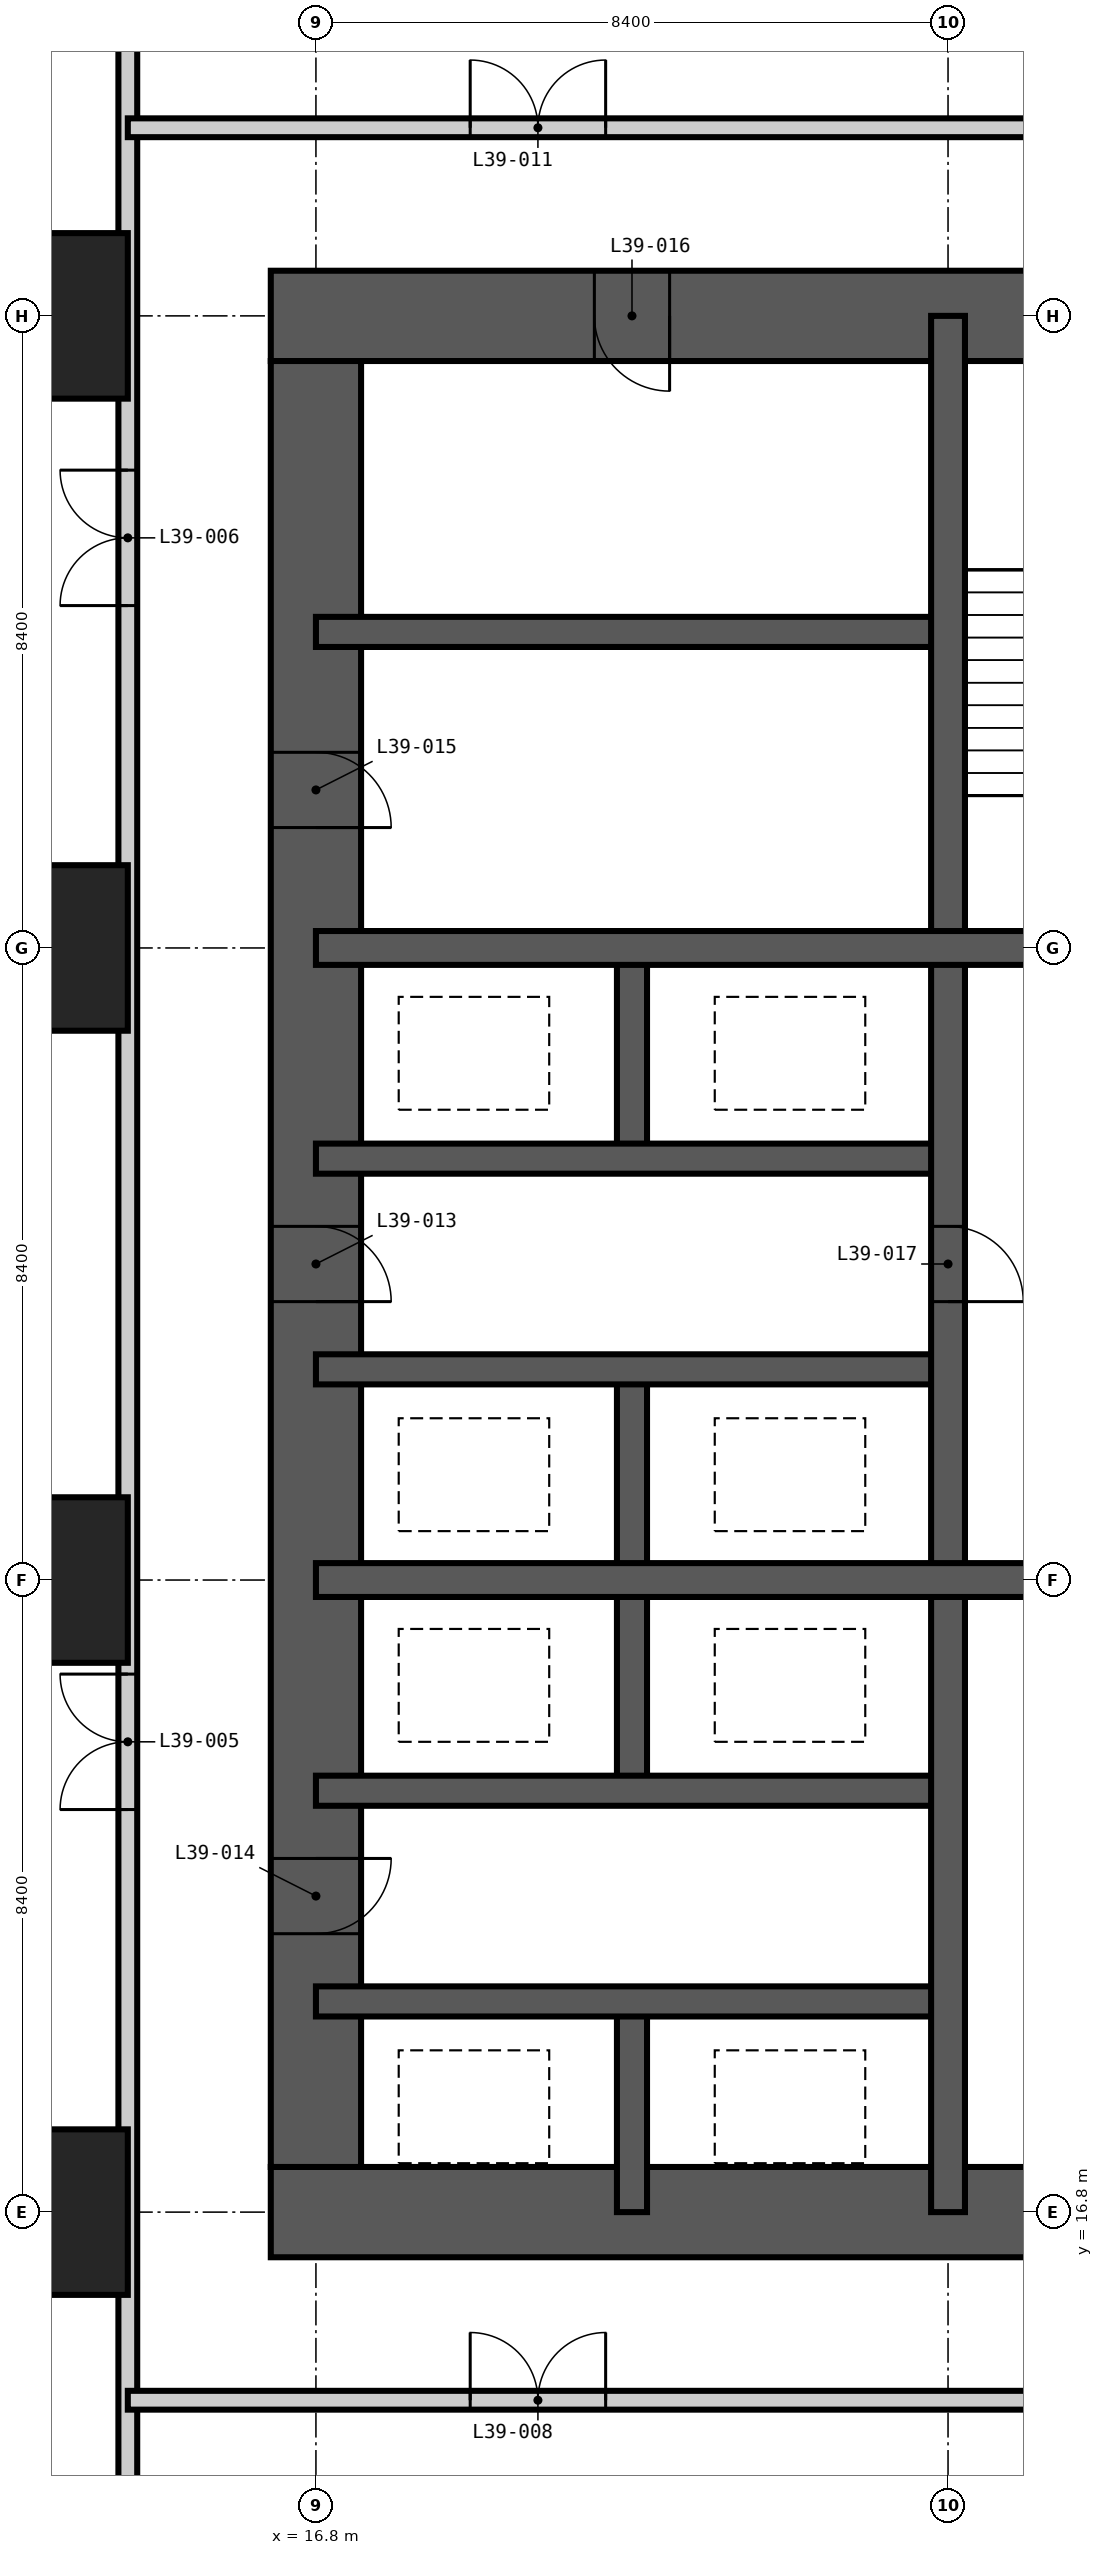
"""IFC4 building model, lengths in metres.
Left out: names, types, materials, properties, quantities, classifications, styles, units other than length and angle.
Written with IfcOpenShell. Run it as: python <this file> out.ifc"""

import sys

from ifc_helpers import new_model, si_unit, direction, frame, frame_2d, origin, origin_2d, place, context, subcontext, project, spatial, rectangle, extrude, element, fill, save


model = new_model("IFC4")
c1 = context("Model", 3, precision=1e-05, world=origin(), true_north=direction((0.0, 1.0)))
c2 = subcontext(c1, "Body", "Model", "MODEL_VIEW")
j1 = project(units=[si_unit("LENGTHUNIT", "METRE"), si_unit("PLANEANGLEUNIT", "RADIAN")], contexts=[c1])
p1 = place(None, origin())
s1 = spatial("IfcSite", under=j1, at=p1, CompositionType="ELEMENT")
p2 = place(p1, origin())
s2 = spatial("IfcBuilding", under=s1, at=p2, CompositionType="ELEMENT")
p3 = place(p2, frame((0.0, 0.0, 153.6)))
s3 = spatial("IfcBuildingStorey", under=s2, at=p3, CompositionType="ELEMENT", Elevation=153.6)
for number, where, z_axis, x_axis in (
    (1, (13.2, 16.8, -0.4), (0.0, 0.0, 1.0), (1.0, 0.0, 0.0)),
    (2, (13.2, 25.2, -0.4), (0.0, 0.0, 1.0), (1.0, 0.0, 0.0)),
    (3, (13.2, 33.6, -0.4), (0.0, 0.0, 1.0), (1.0, 0.0, 0.0)),
    (4, (13.2, 42.0, -0.4), (0.0, 0.0, 1.0), (1.0, 0.0, 0.0)),
):
    element("IfcColumn", number, at=place(p3, frame(where, z_axis=z_axis, x_axis=x_axis)), inside=s3, PredefinedType="COLUMN", context=c2, shape_type="SweptSolid", body=[
        extrude(rectangle(XDim=2.2, YDim=2.2, at=origin_2d()), origin(), (0.0, 0.0, 1.0), 5.45),
    ])
p4 = place(p3, frame((16.2, 16.8, -0.4), z_axis=(0.0, 0.0, 1.0), x_axis=(1.0, 0.0, 0.0)))
e5 = element("IfcWall", 5, at=p4, inside=s3, PredefinedType="SHEAR", context=c2, shape_type="SweptSolid", body=[
    extrude(rectangle(XDim=26.4, YDim=1.2, at=frame_2d((13.2, 0.0))), origin(), (0.0, 0.0, 1.0), 5.45),
])
p5 = place(p4, frame((12.7, 0.0, 0.4)))
e6 = element("IfcOpeningElement", 6, at=p5, cuts=e5, PredefinedType="OPENING", context=c2, shape_type="SweptSolid", body=[
    extrude(rectangle(XDim=1.0, YDim=2.1, at=frame_2d((0.5, 1.05))), frame((0.0, 0.61, 0.0), z_axis=(0.0, -1.0, 0.0), x_axis=(1.0, 0.0, 0.0)), (0.0, 0.0, 1.0), 1.22),
])
p6 = place(p4, frame((19.0, 0.0, 0.4)))
e7 = element("IfcOpeningElement", 7, at=p6, cuts=e5, PredefinedType="OPENING", context=c2, shape_type="SweptSolid", body=[
    extrude(rectangle(XDim=1.0, YDim=2.1, at=frame_2d((0.5, 1.05))), frame((0.0, 0.61, 0.0), z_axis=(0.0, -1.0, 0.0), x_axis=(1.0, 0.0, 0.0)), (0.0, 0.0, 1.0), 1.22),
])
p7 = place(p3, frame((42.6, 42.0, -0.4), z_axis=(0.0, 0.0, 1.0), x_axis=(-1.0, 0.0, 0.0)))
e8 = element("IfcWall", 8, at=p7, inside=s3, PredefinedType="SHEAR", context=c2, shape_type="SweptSolid", body=[
    extrude(rectangle(XDim=26.4, YDim=1.2, at=frame_2d((13.2, 0.0))), origin(), (0.0, 0.0, 1.0), 5.45),
])
p8 = place(p7, frame((21.1, 0.0, 0.4)))
e9 = element("IfcOpeningElement", 9, at=p8, cuts=e8, PredefinedType="OPENING", context=c2, shape_type="SweptSolid", body=[
    extrude(rectangle(XDim=1.0, YDim=2.1, at=frame_2d((0.5, 1.05))), frame((0.0, 0.61, 0.0), z_axis=(0.0, -1.0, 0.0), x_axis=(1.0, 0.0, 0.0)), (0.0, 0.0, 1.0), 1.22),
])
p9 = place(p7, frame((10.5, 0.0, 0.4)))
e10 = element("IfcOpeningElement", 10, at=p9, cuts=e8, PredefinedType="OPENING", context=c2, shape_type="SweptSolid", body=[
    extrude(rectangle(XDim=1.2, YDim=2.2, at=frame_2d((0.6, 1.1))), frame((0.0, 0.61, 0.0), z_axis=(0.0, -1.0, 0.0), x_axis=(1.0, 0.0, 0.0)), (0.0, 0.0, 1.0), 1.22),
])
p10 = place(p3, frame((16.8, 41.4, -0.4), z_axis=(0.0, 0.0, 1.0), x_axis=(0.0, -1.0, 0.0)))
e11 = element("IfcWall", 11, at=p10, inside=s3, PredefinedType="SHEAR", context=c2, shape_type="SweptSolid", body=[
    extrude(rectangle(XDim=24.0, YDim=1.2, at=frame_2d((12.0, 0.0))), origin(), (0.0, 0.0, 1.0), 5.45),
])
p11 = place(p10, frame((11.5, 0.0, 0.4)))
e12 = element("IfcOpeningElement", 12, at=p11, cuts=e11, PredefinedType="OPENING", context=c2, shape_type="SweptSolid", body=[
    extrude(rectangle(XDim=1.0, YDim=2.1, at=frame_2d((0.5, 1.05))), frame((0.0, 0.61, 0.0), z_axis=(0.0, -1.0, 0.0), x_axis=(1.0, 0.0, 0.0)), (0.0, 0.0, 1.0), 1.22),
])
p12 = place(p10, frame((19.9, 0.0, 0.4)))
e13 = element("IfcOpeningElement", 13, at=p12, cuts=e11, PredefinedType="OPENING", context=c2, shape_type="SweptSolid", body=[
    extrude(rectangle(XDim=1.0, YDim=2.1, at=frame_2d((0.5, 1.05))), frame((0.0, 0.61, 0.0), z_axis=(0.0, -1.0, 0.0), x_axis=(1.0, 0.0, 0.0)), (0.0, 0.0, 1.0), 1.22),
])
p13 = place(p10, frame((5.2, 0.0, 0.4)))
e14 = element("IfcOpeningElement", 14, at=p13, cuts=e11, PredefinedType="OPENING", context=c2, shape_type="SweptSolid", body=[
    extrude(rectangle(XDim=1.0, YDim=2.1, at=frame_2d((0.5, 1.05))), frame((0.0, 0.61, 0.0), z_axis=(0.0, -1.0, 0.0), x_axis=(1.0, 0.0, 0.0)), (0.0, 0.0, 1.0), 1.22),
])
p14 = place(p3, frame((21.0, 16.8, -0.4), z_axis=(0.0, 0.0, 1.0), x_axis=(0.0, 1.0, 0.0)))
e15 = element("IfcWall", 15, at=p14, inside=s3, PredefinedType="SHEAR", context=c2, shape_type="SweptSolid", body=[
    extrude(rectangle(XDim=2.8, YDim=0.4, at=frame_2d((1.4, 0.0))), origin(), (0.0, 0.0, 1.0), 5.45),
])
p15 = place(p3, frame((21.0, 22.4, -0.4), z_axis=(0.0, 0.0, 1.0), x_axis=(0.0, 1.0, 0.0)))
e16 = element("IfcWall", 16, at=p15, inside=s3, PredefinedType="SHEAR", context=c2, shape_type="SweptSolid", body=[
    extrude(rectangle(XDim=5.6, YDim=0.4, at=frame_2d((2.8, 0.0))), origin(), (0.0, 0.0, 1.0), 5.45),
])
p16 = place(p3, frame((21.0, 30.8, -0.4), z_axis=(0.0, 0.0, 1.0), x_axis=(0.0, 1.0, 0.0)))
e17 = element("IfcWall", 17, at=p16, inside=s3, PredefinedType="SHEAR", context=c2, shape_type="SweptSolid", body=[
    extrude(rectangle(XDim=2.8, YDim=0.4, at=frame_2d((1.4, 0.0))), origin(), (0.0, 0.0, 1.0), 5.45),
])
for number, where, z_axis, x_axis in (
    (18, (16.8, 19.6, -0.4), (0.0, 0.0, 1.0), (1.0, 0.0, 0.0)),
    (19, (16.8, 22.4, -0.4), (0.0, 0.0, 1.0), (1.0, 0.0, 0.0)),
    (20, (16.8, 28.0, -0.4), (0.0, 0.0, 1.0), (1.0, 0.0, 0.0)),
    (21, (16.8, 30.8, -0.4), (0.0, 0.0, 1.0), (1.0, 0.0, 0.0)),
    (22, (16.8, 37.8, -0.4), (0.0, 0.0, 1.0), (1.0, 0.0, 0.0)),
):
    element("IfcWall", number, at=place(p3, frame(where, z_axis=z_axis, x_axis=x_axis)), inside=s3, PredefinedType="SHEAR", context=c2, shape_type="SweptSolid", body=[
        extrude(rectangle(XDim=8.4, YDim=0.4, at=frame_2d((4.2, 0.0))), origin(), (0.0, 0.0, 1.0), 5.45),
    ])
p17 = place(p3, frame((25.2, 16.8, -0.4), z_axis=(0.0, 0.0, 1.0), x_axis=(0.0, 1.0, 0.0)))
e23 = element("IfcWall", 23, at=p17, inside=s3, PredefinedType="SHEAR", context=c2, shape_type="SweptSolid", body=[
    extrude(rectangle(XDim=25.2, YDim=0.45, at=frame_2d((12.6, 0.0))), origin(), (0.0, 0.0, 1.0), 5.45),
])
p18 = place(p17, frame((12.1, 0.0, 0.4)))
e24 = element("IfcOpeningElement", 24, at=p18, cuts=e23, PredefinedType="OPENING", context=c2, shape_type="SweptSolid", body=[
    extrude(rectangle(XDim=1.0, YDim=2.1, at=frame_2d((0.5, 1.05))), frame((0.0, 0.235, 0.0), z_axis=(0.0, -1.0, 0.0), x_axis=(1.0, 0.0, 0.0)), (0.0, 0.0, 1.0), 0.47),
])
for number, where, z_axis, x_axis in (
    (25, (16.8, 25.2, -0.4), (0.0, 0.0, 1.0), (1.0, 0.0, 0.0)),
    (26, (16.8, 33.6, -0.4), (0.0, 0.0, 1.0), (1.0, 0.0, 0.0)),
):
    element("IfcWall", number, at=place(p3, frame(where, z_axis=z_axis, x_axis=x_axis)), inside=s3, PredefinedType="SHEAR", context=c2, shape_type="SweptSolid", body=[
        extrude(rectangle(XDim=25.2, YDim=0.45, at=frame_2d((12.6, 0.0))), origin(), (0.0, 0.0, 1.0), 5.45),
    ])
p19 = place(p3, frame((14.3, -0.018, 0.0), z_axis=(0.0, 0.0, 1.0), x_axis=(0.0, 1.0, 0.0)))
e27 = element("IfcWall", 27, at=p19, inside=s3, PredefinedType="PARTITIONING", context=c2, shape_type="SweptSolid", body=[
    extrude(rectangle(XDim=54.636, YDim=0.25, at=frame_2d((27.318, 0.0))), origin(), (0.0, 0.0, 1.0), 5.05),
])
p20 = place(p19, frame((22.168, 0.0, 0.0)))
e28 = element("IfcOpeningElement", 28, at=p20, cuts=e27, PredefinedType="OPENING", context=c2, shape_type="SweptSolid", body=[
    extrude(rectangle(XDim=1.8, YDim=2.4, at=frame_2d((0.9, 1.2))), frame((0.0, 0.135, 0.0), z_axis=(0.0, -1.0, 0.0), x_axis=(1.0, 0.0, 0.0)), (0.0, 0.0, 1.0), 0.27),
])
p21 = place(p19, frame((38.168, 0.0, 0.0)))
e29 = element("IfcOpeningElement", 29, at=p21, cuts=e27, PredefinedType="OPENING", context=c2, shape_type="SweptSolid", body=[
    extrude(rectangle(XDim=1.8, YDim=2.4, at=frame_2d((0.9, 1.2))), frame((0.0, 0.135, 0.0), z_axis=(0.0, -1.0, 0.0), x_axis=(1.0, 0.0, 0.0)), (0.0, 0.0, 1.0), 0.27),
])
p22 = place(p3, frame((14.3, 14.3, 0.0), z_axis=(0.0, 0.0, 1.0), x_axis=(1.0, 0.0, 0.0)))
e30 = element("IfcWall", 30, at=p22, inside=s3, PredefinedType="PARTITIONING", context=c2, shape_type="SweptSolid", body=[
    extrude(rectangle(XDim=30.2, YDim=0.25, at=frame_2d((15.1, 0.0))), origin(), (0.0, 0.0, 1.0), 5.05),
])
p23 = place(p22, frame((19.65, 0.0, 0.0)))
e31 = element("IfcOpeningElement", 31, at=p23, cuts=e30, PredefinedType="OPENING", context=c2, shape_type="SweptSolid", body=[
    extrude(rectangle(XDim=1.8, YDim=2.4, at=frame_2d((0.9, 1.2))), frame((0.0, 0.135, 0.0), z_axis=(0.0, -1.0, 0.0), x_axis=(1.0, 0.0, 0.0)), (0.0, 0.0, 1.0), 0.27),
])
p24 = place(p22, frame((4.55, 0.0, 0.0)))
e32 = element("IfcOpeningElement", 32, at=p24, cuts=e30, PredefinedType="OPENING", context=c2, shape_type="SweptSolid", body=[
    extrude(rectangle(XDim=1.8, YDim=2.4, at=frame_2d((0.9, 1.2))), frame((0.0, 0.135, 0.0), z_axis=(0.0, -1.0, 0.0), x_axis=(1.0, 0.0, 0.0)), (0.0, 0.0, 1.0), 0.27),
])
p25 = place(p3, frame((14.3, 44.5, 0.0), z_axis=(0.0, 0.0, 1.0), x_axis=(1.0, 0.0, 0.0)))
e33 = element("IfcWall", 33, at=p25, inside=s3, PredefinedType="PARTITIONING", context=c2, shape_type="SweptSolid", body=[
    extrude(rectangle(XDim=30.2, YDim=0.25, at=frame_2d((15.1, 0.0))), origin(), (0.0, 0.0, 1.0), 5.05),
])
p26 = place(p25, frame((4.55, 0.0, 0.0)))
e34 = element("IfcOpeningElement", 34, at=p26, cuts=e33, PredefinedType="OPENING", context=c2, shape_type="SweptSolid", body=[
    extrude(rectangle(XDim=1.8, YDim=2.4, at=frame_2d((0.9, 1.2))), frame((0.0, 0.135, 0.0), z_axis=(0.0, -1.0, 0.0), x_axis=(1.0, 0.0, 0.0)), (0.0, 0.0, 1.0), 0.27),
])
p27 = place(p25, frame((23.85, 0.0, 0.0)))
e35 = element("IfcOpeningElement", 35, at=p27, cuts=e33, PredefinedType="OPENING", context=c2, shape_type="SweptSolid", body=[
    extrude(rectangle(XDim=1.8, YDim=2.4, at=frame_2d((0.9, 1.2))), frame((0.0, 0.135, 0.0), z_axis=(0.0, -1.0, 0.0), x_axis=(1.0, 0.0, 0.0)), (0.0, 0.0, 1.0), 0.27),
])
p28 = place(p20, origin())
e36 = element("IfcDoor", 36, at=p28, inside=s3, OperationType="DOUBLE_DOOR_DOUBLE_SWING", PredefinedType="DOOR", context=c2, shape_type="SweptSolid", body=[
    extrude(rectangle(XDim=1.8, YDim=2.4, at=frame_2d((0.9, 1.2))), frame((0.0, 0.025, 0.0), z_axis=(0.0, -1.0, 0.0), x_axis=(1.0, 0.0, 0.0)), (0.0, 0.0, 1.0), 0.05),
])
fill(e28, e36)
p29 = place(p21, origin())
e37 = element("IfcDoor", 37, at=p29, inside=s3, OperationType="DOUBLE_DOOR_DOUBLE_SWING", PredefinedType="DOOR", context=c2, shape_type="SweptSolid", body=[
    extrude(rectangle(XDim=1.8, YDim=2.4, at=frame_2d((0.9, 1.2))), frame((0.0, 0.025, 0.0), z_axis=(0.0, -1.0, 0.0), x_axis=(1.0, 0.0, 0.0)), (0.0, 0.0, 1.0), 0.05),
])
fill(e29, e37)
p30 = place(p24, origin())
e38 = element("IfcDoor", 38, at=p30, inside=s3, OperationType="DOUBLE_DOOR_DOUBLE_SWING", PredefinedType="DOOR", context=c2, shape_type="SweptSolid", body=[
    extrude(rectangle(XDim=1.8, YDim=2.4, at=frame_2d((0.9, 1.2))), frame((0.0, 0.025, 0.0), z_axis=(0.0, -1.0, 0.0), x_axis=(1.0, 0.0, 0.0)), (0.0, 0.0, 1.0), 0.05),
])
fill(e32, e38)
p31 = place(p26, origin())
e39 = element("IfcDoor", 39, at=p31, inside=s3, OperationType="DOUBLE_DOOR_DOUBLE_SWING", PredefinedType="DOOR", context=c2, shape_type="SweptSolid", body=[
    extrude(rectangle(XDim=1.8, YDim=2.4, at=frame_2d((0.9, 1.2))), frame((0.0, 0.025, 0.0), z_axis=(0.0, -1.0, 0.0), x_axis=(1.0, 0.0, 0.0)), (0.0, 0.0, 1.0), 0.05),
])
fill(e34, e39)
p32 = place(p11, origin())
e40 = element("IfcDoor", 40, at=p32, inside=s3, OperationType="SINGLE_SWING_RIGHT", PredefinedType="DOOR", context=c2, shape_type="SweptSolid", body=[
    extrude(rectangle(XDim=1.0, YDim=2.1, at=frame_2d((0.5, 1.05))), frame((0.0, 0.025, 0.0), z_axis=(0.0, -1.0, 0.0), x_axis=(1.0, 0.0, 0.0)), (0.0, 0.0, 1.0), 0.05),
])
fill(e12, e40)
p33 = place(p12, origin())
e41 = element("IfcDoor", 41, at=p33, inside=s3, OperationType="SINGLE_SWING_LEFT", PredefinedType="DOOR", context=c2, shape_type="SweptSolid", body=[
    extrude(rectangle(XDim=1.0, YDim=2.1, at=frame_2d((0.5, 1.05))), frame((0.0, 0.025, 0.0), z_axis=(0.0, -1.0, 0.0), x_axis=(1.0, 0.0, 0.0)), (0.0, 0.0, 1.0), 0.05),
])
fill(e13, e41)
p34 = place(p13, origin())
e42 = element("IfcDoor", 42, at=p34, inside=s3, OperationType="SINGLE_SWING_RIGHT", PredefinedType="DOOR", context=c2, shape_type="SweptSolid", body=[
    extrude(rectangle(XDim=1.0, YDim=2.1, at=frame_2d((0.5, 1.05))), frame((0.0, 0.025, 0.0), z_axis=(0.0, -1.0, 0.0), x_axis=(1.0, 0.0, 0.0)), (0.0, 0.0, 1.0), 0.05),
])
fill(e14, e42)
p35 = place(p8, origin())
e43 = element("IfcDoor", 43, at=p35, inside=s3, OperationType="SINGLE_SWING_LEFT", PredefinedType="DOOR", context=c2, shape_type="SweptSolid", body=[
    extrude(rectangle(XDim=1.0, YDim=2.1, at=frame_2d((0.5, 1.05))), frame((0.0, 0.025, 0.0), z_axis=(0.0, -1.0, 0.0), x_axis=(1.0, 0.0, 0.0)), (0.0, 0.0, 1.0), 0.05),
])
fill(e9, e43)
p36 = place(p18, frame((1.0, 0.0, 0.0), z_axis=(0.0, 0.0, 1.0), x_axis=(-1.0, 0.0, 0.0)))
e44 = element("IfcDoor", 44, at=p36, inside=s3, OperationType="SINGLE_SWING_RIGHT", PredefinedType="DOOR", context=c2, shape_type="SweptSolid", body=[
    extrude(rectangle(XDim=1.0, YDim=2.1, at=frame_2d((0.5, 1.05))), frame((0.0, 0.025, 0.0), z_axis=(0.0, -1.0, 0.0), x_axis=(1.0, 0.0, 0.0)), (0.0, 0.0, 1.0), 0.05),
])
fill(e24, e44)
save(model, sys.argv[1])
